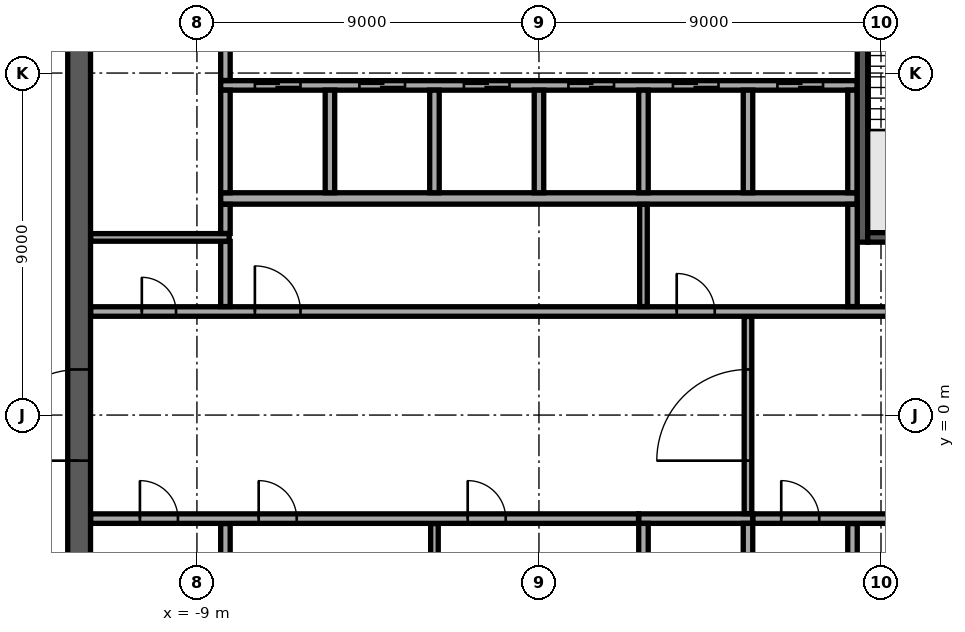
"""IFC4 building model, lengths in metres.
Left out: names, types, materials, properties, quantities, classifications, styles, units other than length and angle.
Written with IfcOpenShell. Run it as: python <this file> out.ifc"""

import sys

from ifc_helpers import new_model, si_unit, direction, frame, frame_2d, origin, place, context, subcontext, project, spatial, rectangle, extrude, element, fill, save


model = new_model("IFC4")
c1 = context("Model", 3, precision=1e-05, world=origin(), true_north=direction((0.0, 1.0)))
c2 = subcontext(c1, "Body", "Model", "MODEL_VIEW")
j1 = project(units=[si_unit("LENGTHUNIT", "METRE"), si_unit("PLANEANGLEUNIT", "RADIAN")], contexts=[c1])
p1 = place(None, origin())
s1 = spatial("IfcSite", under=j1, at=p1, CompositionType="ELEMENT")
p2 = place(p1, origin())
s2 = spatial("IfcBuilding", under=s1, at=p2, CompositionType="ELEMENT")
p3 = place(p2, frame((0.0, 0.0, 304.5)))
s3 = spatial("IfcBuildingStorey", under=s2, at=p3, CompositionType="ELEMENT", Elevation=304.5)
p4 = place(p3, frame((-12.1, -11.8, 0.0), z_axis=(0.0, 0.0, 1.0), x_axis=(0.0, 1.0, 0.0)))
e1 = element("IfcWall", 1, at=p4, inside=s3, PredefinedType="SHEAR", context=c2, shape_type="SweptSolid", body=[
    extrude(rectangle(XDim=23.6, YDim=0.6, at=frame_2d((11.8, 0.0))), origin(), (0.0, 0.0, 1.0), 3.65),
])
p5 = place(p4, frame((10.6, 0.0, 0.0)))
e2 = element("IfcOpeningElement", 2, at=p5, cuts=e1, PredefinedType="OPENING", context=c2, shape_type="SweptSolid", body=[
    extrude(rectangle(XDim=2.4, YDim=2.4, at=frame_2d((1.2, 1.2))), frame((0.0, 0.31, 0.0), z_axis=(0.0, -1.0, 0.0), x_axis=(1.0, 0.0, 0.0)), (0.0, 0.0, 1.0), 0.62),
])
p6 = place(p3, frame((-8.375, 5.7, 0.0), z_axis=(0.0, 0.0, 1.0), x_axis=(1.0, 0.0, 0.0)))
e3 = element("IfcWall", 3, at=p6, inside=s3, PredefinedType="SOLIDWALL", context=c2, shape_type="SweptSolid", body=[
    extrude(rectangle(XDim=16.75, YDim=0.3, at=frame_2d((8.375, 0.0))), origin(), (0.0, 0.0, 1.0), 3.65),
])
p7 = place(p3, frame((-8.375, 8.675, 0.0), z_axis=(0.0, 0.0, 1.0), x_axis=(1.0, 0.0, 0.0)))
e4 = element("IfcWall", 4, at=p7, inside=s3, PredefinedType="SOLIDWALL", context=c2, shape_type="SweptSolid", body=[
    extrude(rectangle(XDim=16.75, YDim=0.25, at=frame_2d((8.375, 0.0))), origin(), (0.0, 0.0, 1.0), 3.65),
])
p8 = place(p7, frame((0.9, 0.0, 0.0)))
e5 = element("IfcOpeningElement", 5, at=p8, cuts=e4, PredefinedType="OPENING", context=c2, shape_type="SweptSolid", body=[
    extrude(rectangle(XDim=1.2, YDim=2.1, at=frame_2d((0.6, 1.05))), frame((0.0, 0.135, 0.0), z_axis=(0.0, -1.0, 0.0), x_axis=(1.0, 0.0, 0.0)), (0.0, 0.0, 1.0), 0.27),
])
p9 = place(p7, frame((3.65, 0.0, 0.0)))
e6 = element("IfcOpeningElement", 6, at=p9, cuts=e4, PredefinedType="OPENING", context=c2, shape_type="SweptSolid", body=[
    extrude(rectangle(XDim=1.2, YDim=2.1, at=frame_2d((0.6, 1.05))), frame((0.0, 0.135, 0.0), z_axis=(0.0, -1.0, 0.0), x_axis=(1.0, 0.0, 0.0)), (0.0, 0.0, 1.0), 0.27),
])
p10 = place(p7, frame((6.4, 0.0, 0.0)))
e7 = element("IfcOpeningElement", 7, at=p10, cuts=e4, PredefinedType="OPENING", context=c2, shape_type="SweptSolid", body=[
    extrude(rectangle(XDim=1.2, YDim=2.1, at=frame_2d((0.6, 1.05))), frame((0.0, 0.135, 0.0), z_axis=(0.0, -1.0, 0.0), x_axis=(1.0, 0.0, 0.0)), (0.0, 0.0, 1.0), 0.27),
])
p11 = place(p7, frame((9.15, 0.0, 0.0)))
e8 = element("IfcOpeningElement", 8, at=p11, cuts=e4, PredefinedType="OPENING", context=c2, shape_type="SweptSolid", body=[
    extrude(rectangle(XDim=1.2, YDim=2.1, at=frame_2d((0.6, 1.05))), frame((0.0, 0.135, 0.0), z_axis=(0.0, -1.0, 0.0), x_axis=(1.0, 0.0, 0.0)), (0.0, 0.0, 1.0), 0.27),
])
p12 = place(p7, frame((11.9, 0.0, 0.0)))
e9 = element("IfcOpeningElement", 9, at=p12, cuts=e4, PredefinedType="OPENING", context=c2, shape_type="SweptSolid", body=[
    extrude(rectangle(XDim=1.2, YDim=2.1, at=frame_2d((0.6, 1.05))), frame((0.0, 0.135, 0.0), z_axis=(0.0, -1.0, 0.0), x_axis=(1.0, 0.0, 0.0)), (0.0, 0.0, 1.0), 0.27),
])
p13 = place(p7, frame((14.65, 0.0, 0.0)))
e10 = element("IfcOpeningElement", 10, at=p13, cuts=e4, PredefinedType="OPENING", context=c2, shape_type="SweptSolid", body=[
    extrude(rectangle(XDim=1.2, YDim=2.1, at=frame_2d((0.6, 1.05))), frame((0.0, 0.135, 0.0), z_axis=(0.0, -1.0, 0.0), x_axis=(1.0, 0.0, 0.0)), (0.0, 0.0, 1.0), 0.27),
])
for number, where, z_axis, x_axis in (
    (11, (-8.25, 5.85, 0.0), (0.0, 0.0, 1.0), (0.0, 1.0, 0.0)),
    (12, (-5.5, 5.85, 0.0), (0.0, 0.0, 1.0), (0.0, 1.0, 0.0)),
    (13, (-2.75, 5.85, 0.0), (0.0, 0.0, 1.0), (0.0, 1.0, 0.0)),
    (14, (0.0, 5.85, 0.0), (0.0, 0.0, 1.0), (0.0, 1.0, 0.0)),
    (15, (2.75, 5.85, 0.0), (0.0, 0.0, 1.0), (0.0, 1.0, 0.0)),
    (16, (5.5, 5.85, 0.0), (0.0, 0.0, 1.0), (0.0, 1.0, 0.0)),
    (17, (8.25, 5.85, 0.0), (0.0, 0.0, 1.0), (0.0, 1.0, 0.0)),
):
    element("IfcWall", number, at=place(p3, frame(where, z_axis=z_axis, x_axis=x_axis)), inside=s3, PredefinedType="SOLIDWALL", context=c2, shape_type="SweptSolid", body=[
        extrude(rectangle(XDim=2.7, YDim=0.25, at=frame_2d((1.35, 0.0))), origin(), (0.0, 0.0, 1.0), 3.65),
    ])
p14 = place(p3, frame((2.625, -2.725, 0.0), z_axis=(0.0, 0.0, 1.0), x_axis=(1.0, 0.0, 0.0)))
e18 = element("IfcWall", 18, at=p14, inside=s3, PredefinedType="SOLIDWALL", context=c2, shape_type="SweptSolid", body=[
    extrude(rectangle(XDim=3.0, YDim=0.25, at=frame_2d((1.5, 0.0))), origin(), (0.0, 0.0, 1.0), 3.65),
])
for number, where, z_axis, x_axis in (
    (19, (2.75, -5.55, 0.0), (0.0, 0.0, 1.0), (0.0, 1.0, 0.0)),
    (20, (5.5, -5.55, 0.0), (0.0, 0.0, 1.0), (0.0, 1.0, 0.0)),
):
    element("IfcWall", number, at=place(p3, frame(where, z_axis=z_axis, x_axis=x_axis)), inside=s3, PredefinedType="SOLIDWALL", context=c2, shape_type="SweptSolid", body=[
        extrude(rectangle(XDim=2.7, YDim=0.25, at=frame_2d((1.35, 0.0))), origin(), (0.0, 0.0, 1.0), 3.65),
    ])
p15 = place(p3, frame((8.512, 4.55, 0.0), z_axis=(0.0, 0.0, 1.0), x_axis=(0.0, 1.0, 0.0)))
e21 = element("IfcWall", 21, at=p15, inside=s3, PredefinedType="SOLIDWALL", context=c2, shape_type="SweptSolid", body=[
    extrude(rectangle(XDim=7.25, YDim=0.275, at=frame_2d((3.625, 0.0))), origin(), (0.0, 0.0, 1.0), 3.65),
])
p16 = place(p15, frame((6.0, 0.0, 0.0)))
e22 = element("IfcOpeningElement", 22, at=p16, cuts=e21, PredefinedType="OPENING", context=c2, shape_type="SweptSolid", body=[
    extrude(rectangle(XDim=1.0, YDim=2.1, at=frame_2d((0.5, 1.05))), frame((0.0, 0.147, 0.0), z_axis=(0.0, -1.0, 0.0), x_axis=(1.0, 0.0, 0.0)), (0.0, 0.0, 1.0), 0.295),
])
p17 = place(p3, frame((8.65, 4.675, 0.0), z_axis=(0.0, 0.0, 1.0), x_axis=(1.0, 0.0, 0.0)))
e23 = element("IfcWall", 23, at=p17, inside=s3, PredefinedType="SOLIDWALL", context=c2, shape_type="SweptSolid", body=[
    extrude(rectangle(XDim=3.15, YDim=0.25, at=frame_2d((1.575, 0.0))), origin(), (0.0, 0.0, 1.0), 3.65),
])
p18 = place(p3, frame((-8.25, -5.545, 0.0), z_axis=(0.0, 0.0, 1.0), x_axis=(0.0, 1.0, 0.0)))
e24 = element("IfcWall", 24, at=p18, inside=s3, PredefinedType="PARTITIONING", context=c2, shape_type="SweptSolid", body=[
    extrude(rectangle(XDim=2.69, YDim=0.25, at=frame_2d((1.345, 0.0))), origin(), (0.0, 0.0, 1.0), 3.65),
])
p19 = place(p3, frame((-2.75, -5.545, 0.0), z_axis=(0.0, 0.0, 1.0), x_axis=(0.0, 1.0, 0.0)))
e25 = element("IfcWall", 25, at=p19, inside=s3, PredefinedType="PARTITIONING", context=c2, shape_type="SweptSolid", body=[
    extrude(rectangle(XDim=2.69, YDim=0.2, at=frame_2d((1.345, 0.0))), origin(), (0.0, 0.0, 1.0), 3.65),
])
p20 = place(p3, frame((8.25, -5.545, 0.0), z_axis=(0.0, 0.0, 1.0), x_axis=(0.0, 1.0, 0.0)))
e26 = element("IfcWall", 26, at=p20, inside=s3, PredefinedType="PARTITIONING", context=c2, shape_type="SweptSolid", body=[
    extrude(rectangle(XDim=2.69, YDim=0.25, at=frame_2d((1.345, 0.0))), origin(), (0.0, 0.0, 1.0), 3.65),
])
p21 = place(p3, frame((-11.795, -2.725, 0.0), z_axis=(0.0, 0.0, 1.0), x_axis=(1.0, 0.0, 0.0)))
e27 = element("IfcWall", 27, at=p21, inside=s3, PredefinedType="PARTITIONING", context=c2, shape_type="SweptSolid", body=[
    extrude(rectangle(XDim=14.415, YDim=0.25, at=frame_2d((7.208, 0.0))), origin(), (0.0, 0.0, 1.0), 3.65),
])
p22 = place(p21, frame((1.295, 0.0, 0.0)))
e28 = element("IfcOpeningElement", 28, at=p22, cuts=e27, PredefinedType="OPENING", context=c2, shape_type="SweptSolid", body=[
    extrude(rectangle(XDim=1.0, YDim=2.1, at=frame_2d((0.5, 1.05))), frame((0.0, 0.135, 0.0), z_axis=(0.0, -1.0, 0.0), x_axis=(1.0, 0.0, 0.0)), (0.0, 0.0, 1.0), 0.27),
])
p23 = place(p21, frame((4.42, 0.0, 0.0)))
e29 = element("IfcOpeningElement", 29, at=p23, cuts=e27, PredefinedType="OPENING", context=c2, shape_type="SweptSolid", body=[
    extrude(rectangle(XDim=1.0, YDim=2.1, at=frame_2d((0.5, 1.05))), frame((0.0, 0.135, 0.0), z_axis=(0.0, -1.0, 0.0), x_axis=(1.0, 0.0, 0.0)), (0.0, 0.0, 1.0), 0.27),
])
p24 = place(p21, frame((9.92, 0.0, 0.0)))
e30 = element("IfcOpeningElement", 30, at=p24, cuts=e27, PredefinedType="OPENING", context=c2, shape_type="SweptSolid", body=[
    extrude(rectangle(XDim=1.0, YDim=2.1, at=frame_2d((0.5, 1.05))), frame((0.0, 0.135, 0.0), z_axis=(0.0, -1.0, 0.0), x_axis=(1.0, 0.0, 0.0)), (0.0, 0.0, 1.0), 0.27),
])
p25 = place(p3, frame((5.63, -2.725, 0.0), z_axis=(0.0, 0.0, 1.0), x_axis=(1.0, 0.0, 0.0)))
e31 = element("IfcWall", 31, at=p25, inside=s3, PredefinedType="PARTITIONING", context=c2, shape_type="SweptSolid", body=[
    extrude(rectangle(XDim=6.165, YDim=0.25, at=frame_2d((3.083, 0.0))), origin(), (0.0, 0.0, 1.0), 3.65),
])
p26 = place(p25, frame((0.745, 0.0, 0.0)))
e32 = element("IfcOpeningElement", 32, at=p26, cuts=e31, PredefinedType="OPENING", context=c2, shape_type="SweptSolid", body=[
    extrude(rectangle(XDim=1.0, YDim=2.1, at=frame_2d((0.5, 1.05))), frame((0.0, 0.135, 0.0), z_axis=(0.0, -1.0, 0.0), x_axis=(1.0, 0.0, 0.0)), (0.0, 0.0, 1.0), 0.27),
])
p27 = place(p25, frame((3.92, 0.0, 0.0)))
e33 = element("IfcOpeningElement", 33, at=p27, cuts=e31, PredefinedType="OPENING", context=c2, shape_type="SweptSolid", body=[
    extrude(rectangle(XDim=0.9, YDim=2.1, at=frame_2d((0.45, 1.05))), frame((0.0, 0.135, 0.0), z_axis=(0.0, -1.0, 0.0), x_axis=(1.0, 0.0, 0.0)), (0.0, 0.0, 1.0), 0.27),
])
p28 = place(p3, frame((5.5, -2.595, 0.0), z_axis=(0.0, 0.0, 1.0), x_axis=(0.0, 1.0, 0.0)))
e34 = element("IfcWall", 34, at=p28, inside=s3, PredefinedType="PARTITIONING", context=c2, shape_type="SweptSolid", body=[
    extrude(rectangle(XDim=5.19, YDim=0.2, at=frame_2d((2.595, 0.0))), origin(), (0.0, 0.0, 1.0), 3.65),
])
p29 = place(p28, frame((1.395, 0.0, 0.0)))
e35 = element("IfcOpeningElement", 35, at=p29, cuts=e34, PredefinedType="OPENING", context=c2, shape_type="SweptSolid", body=[
    extrude(rectangle(XDim=2.4, YDim=2.4, at=frame_2d((1.2, 1.2))), frame((0.0, 0.11, 0.0), z_axis=(0.0, -1.0, 0.0), x_axis=(1.0, 0.0, 0.0)), (0.0, 0.0, 1.0), 0.22),
])
p30 = place(p3, frame((-11.795, 2.725, 0.0), z_axis=(0.0, 0.0, 1.0), x_axis=(1.0, 0.0, 0.0)))
e36 = element("IfcWall", 36, at=p30, inside=s3, PredefinedType="PARTITIONING", context=c2, shape_type="SweptSolid", body=[
    extrude(rectangle(XDim=23.59, YDim=0.25, at=frame_2d((11.795, 0.0))), origin(), (0.0, 0.0, 1.0), 3.65),
])
p31 = place(p30, frame((21.345, 0.0, 0.0)))
e37 = element("IfcOpeningElement", 37, at=p31, cuts=e36, PredefinedType="OPENING", context=c2, shape_type="SweptSolid", body=[
    extrude(rectangle(XDim=0.9, YDim=2.1, at=frame_2d((0.45, 1.05))), frame((0.0, 0.135, 0.0), z_axis=(0.0, -1.0, 0.0), x_axis=(1.0, 0.0, 0.0)), (0.0, 0.0, 1.0), 0.27),
])
p32 = place(p30, frame((1.345, 0.0, 0.0)))
e38 = element("IfcOpeningElement", 38, at=p32, cuts=e36, PredefinedType="OPENING", context=c2, shape_type="SweptSolid", body=[
    extrude(rectangle(XDim=0.9, YDim=2.1, at=frame_2d((0.45, 1.05))), frame((0.0, 0.135, 0.0), z_axis=(0.0, -1.0, 0.0), x_axis=(1.0, 0.0, 0.0)), (0.0, 0.0, 1.0), 0.27),
])
p33 = place(p30, frame((4.32, 0.0, 0.0)))
e39 = element("IfcOpeningElement", 39, at=p33, cuts=e36, PredefinedType="OPENING", context=c2, shape_type="SweptSolid", body=[
    extrude(rectangle(XDim=1.2, YDim=2.1, at=frame_2d((0.6, 1.05))), frame((0.0, 0.135, 0.0), z_axis=(0.0, -1.0, 0.0), x_axis=(1.0, 0.0, 0.0)), (0.0, 0.0, 1.0), 0.27),
])
p34 = place(p30, frame((15.42, 0.0, 0.0)))
e40 = element("IfcOpeningElement", 40, at=p34, cuts=e36, PredefinedType="OPENING", context=c2, shape_type="SweptSolid", body=[
    extrude(rectangle(XDim=1.0, YDim=2.1, at=frame_2d((0.5, 1.05))), frame((0.0, 0.135, 0.0), z_axis=(0.0, -1.0, 0.0), x_axis=(1.0, 0.0, 0.0)), (0.0, 0.0, 1.0), 0.27),
])
p35 = place(p3, frame((-8.25, 2.855, 0.0), z_axis=(0.0, 0.0, 1.0), x_axis=(0.0, 1.0, 0.0)))
e41 = element("IfcWall", 41, at=p35, inside=s3, PredefinedType="PARTITIONING", context=c2, shape_type="SweptSolid", body=[
    extrude(rectangle(XDim=1.715, YDim=0.25, at=frame_2d((0.857, 0.0))), origin(), (0.0, 0.0, 1.0), 3.65),
])
p36 = place(p3, frame((2.75, 2.855, 0.0), z_axis=(0.0, 0.0, 1.0), x_axis=(0.0, 1.0, 0.0)))
e42 = element("IfcWall", 42, at=p36, inside=s3, PredefinedType="PARTITIONING", context=c2, shape_type="SweptSolid", body=[
    extrude(rectangle(XDim=2.69, YDim=0.2, at=frame_2d((1.345, 0.0))), origin(), (0.0, 0.0, 1.0), 3.65),
])
p37 = place(p3, frame((8.25, 2.855, 0.0), z_axis=(0.0, 0.0, 1.0), x_axis=(0.0, 1.0, 0.0)))
e43 = element("IfcWall", 43, at=p37, inside=s3, PredefinedType="PARTITIONING", context=c2, shape_type="SweptSolid", body=[
    extrude(rectangle(XDim=2.69, YDim=0.25, at=frame_2d((1.345, 0.0))), origin(), (0.0, 0.0, 1.0), 3.65),
])
p38 = place(p3, frame((-11.795, 4.675, 0.0), z_axis=(0.0, 0.0, 1.0), x_axis=(1.0, 0.0, 0.0)))
e44 = element("IfcWall", 44, at=p38, inside=s3, PredefinedType="PARTITIONING", context=c2, shape_type="SweptSolid", body=[
    extrude(rectangle(XDim=3.645, YDim=0.2, at=frame_2d((1.823, 0.0))), origin(), (0.0, 0.0, 1.0), 3.65),
])
p39 = place(p3, frame((-8.25, 4.78, 0.0), z_axis=(0.0, 0.0, 1.0), x_axis=(0.0, 1.0, 0.0)))
e45 = element("IfcWall", 45, at=p39, inside=s3, PredefinedType="PARTITIONING", context=c2, shape_type="SweptSolid", body=[
    extrude(rectangle(XDim=0.765, YDim=0.25, at=frame_2d((0.382, 0.0))), origin(), (0.0, 0.0, 1.0), 3.65),
])
p40 = place(p3, frame((-8.25, 8.805, 0.0), z_axis=(0.0, 0.0, 1.0), x_axis=(0.0, 1.0, 0.0)))
e46 = element("IfcWall", 46, at=p40, inside=s3, PredefinedType="PARTITIONING", context=c2, shape_type="SweptSolid", body=[
    extrude(rectangle(XDim=2.99, YDim=0.25, at=frame_2d((1.495, 0.0))), origin(), (0.0, 0.0, 1.0), 3.65),
])
p41 = place(p40, frame((0.895, 0.0, 0.0)))
e47 = element("IfcOpeningElement", 47, at=p41, cuts=e46, PredefinedType="OPENING", context=c2, shape_type="SweptSolid", body=[
    extrude(rectangle(XDim=1.0, YDim=2.1, at=frame_2d((0.5, 1.05))), frame((0.0, 0.135, 0.0), z_axis=(0.0, -1.0, 0.0), x_axis=(1.0, 0.0, 0.0)), (0.0, 0.0, 1.0), 0.27),
])
p42 = place(p5, origin())
e48 = element("IfcDoor", 48, at=p42, inside=s3, OperationType="SINGLE_SWING_LEFT", PredefinedType="DOOR", context=c2, shape_type="SweptSolid", body=[
    extrude(rectangle(XDim=2.4, YDim=2.4, at=frame_2d((1.2, 1.2))), frame((0.0, 0.025, 0.0), z_axis=(0.0, -1.0, 0.0), x_axis=(1.0, 0.0, 0.0)), (0.0, 0.0, 1.0), 0.05),
])
fill(e2, e48)
p43 = place(p8, origin())
e49 = element("IfcDoor", 49, at=p43, inside=s3, OperationType="DOUBLE_DOOR_SLIDING", PredefinedType="DOOR", context=c2, shape_type="SweptSolid", body=[
    extrude(rectangle(XDim=1.2, YDim=2.1, at=frame_2d((0.6, 1.05))), frame((0.0, 0.025, 0.0), z_axis=(0.0, -1.0, 0.0), x_axis=(1.0, 0.0, 0.0)), (0.0, 0.0, 1.0), 0.05),
])
fill(e5, e49)
p44 = place(p9, origin())
e50 = element("IfcDoor", 50, at=p44, inside=s3, OperationType="DOUBLE_DOOR_SLIDING", PredefinedType="DOOR", context=c2, shape_type="SweptSolid", body=[
    extrude(rectangle(XDim=1.2, YDim=2.1, at=frame_2d((0.6, 1.05))), frame((0.0, 0.025, 0.0), z_axis=(0.0, -1.0, 0.0), x_axis=(1.0, 0.0, 0.0)), (0.0, 0.0, 1.0), 0.05),
])
fill(e6, e50)
p45 = place(p10, origin())
e51 = element("IfcDoor", 51, at=p45, inside=s3, OperationType="DOUBLE_DOOR_SLIDING", PredefinedType="DOOR", context=c2, shape_type="SweptSolid", body=[
    extrude(rectangle(XDim=1.2, YDim=2.1, at=frame_2d((0.6, 1.05))), frame((0.0, 0.025, 0.0), z_axis=(0.0, -1.0, 0.0), x_axis=(1.0, 0.0, 0.0)), (0.0, 0.0, 1.0), 0.05),
])
fill(e7, e51)
p46 = place(p11, origin())
e52 = element("IfcDoor", 52, at=p46, inside=s3, OperationType="DOUBLE_DOOR_SLIDING", PredefinedType="DOOR", context=c2, shape_type="SweptSolid", body=[
    extrude(rectangle(XDim=1.2, YDim=2.1, at=frame_2d((0.6, 1.05))), frame((0.0, 0.025, 0.0), z_axis=(0.0, -1.0, 0.0), x_axis=(1.0, 0.0, 0.0)), (0.0, 0.0, 1.0), 0.05),
])
fill(e8, e52)
p47 = place(p12, origin())
e53 = element("IfcDoor", 53, at=p47, inside=s3, OperationType="DOUBLE_DOOR_SLIDING", PredefinedType="DOOR", context=c2, shape_type="SweptSolid", body=[
    extrude(rectangle(XDim=1.2, YDim=2.1, at=frame_2d((0.6, 1.05))), frame((0.0, 0.025, 0.0), z_axis=(0.0, -1.0, 0.0), x_axis=(1.0, 0.0, 0.0)), (0.0, 0.0, 1.0), 0.05),
])
fill(e9, e53)
p48 = place(p13, origin())
e54 = element("IfcDoor", 54, at=p48, inside=s3, OperationType="DOUBLE_DOOR_SLIDING", PredefinedType="DOOR", context=c2, shape_type="SweptSolid", body=[
    extrude(rectangle(XDim=1.2, YDim=2.1, at=frame_2d((0.6, 1.05))), frame((0.0, 0.025, 0.0), z_axis=(0.0, -1.0, 0.0), x_axis=(1.0, 0.0, 0.0)), (0.0, 0.0, 1.0), 0.05),
])
fill(e10, e54)
p49 = place(p22, origin())
e55 = element("IfcDoor", 55, at=p49, inside=s3, OperationType="SINGLE_SWING_LEFT", PredefinedType="DOOR", context=c2, shape_type="SweptSolid", body=[
    extrude(rectangle(XDim=1.0, YDim=2.1, at=frame_2d((0.5, 1.05))), frame((0.0, 0.025, 0.0), z_axis=(0.0, -1.0, 0.0), x_axis=(1.0, 0.0, 0.0)), (0.0, 0.0, 1.0), 0.05),
])
fill(e28, e55)
p50 = place(p26, origin())
e56 = element("IfcDoor", 56, at=p50, inside=s3, OperationType="SINGLE_SWING_LEFT", PredefinedType="DOOR", context=c2, shape_type="SweptSolid", body=[
    extrude(rectangle(XDim=1.0, YDim=2.1, at=frame_2d((0.5, 1.05))), frame((0.0, 0.025, 0.0), z_axis=(0.0, -1.0, 0.0), x_axis=(1.0, 0.0, 0.0)), (0.0, 0.0, 1.0), 0.05),
])
fill(e32, e56)
p51 = place(p32, origin())
e57 = element("IfcDoor", 57, at=p51, inside=s3, OperationType="SINGLE_SWING_LEFT", PredefinedType="DOOR", context=c2, shape_type="SweptSolid", body=[
    extrude(rectangle(XDim=0.9, YDim=2.1, at=frame_2d((0.45, 1.05))), frame((0.0, 0.025, 0.0), z_axis=(0.0, -1.0, 0.0), x_axis=(1.0, 0.0, 0.0)), (0.0, 0.0, 1.0), 0.05),
])
fill(e38, e57)
p52 = place(p33, origin())
e58 = element("IfcDoor", 58, at=p52, inside=s3, OperationType="SINGLE_SWING_LEFT", PredefinedType="DOOR", context=c2, shape_type="SweptSolid", body=[
    extrude(rectangle(XDim=1.2, YDim=2.1, at=frame_2d((0.6, 1.05))), frame((0.0, 0.025, 0.0), z_axis=(0.0, -1.0, 0.0), x_axis=(1.0, 0.0, 0.0)), (0.0, 0.0, 1.0), 0.05),
])
fill(e39, e58)
p53 = place(p34, origin())
e59 = element("IfcDoor", 59, at=p53, inside=s3, OperationType="SINGLE_SWING_LEFT", PredefinedType="DOOR", context=c2, shape_type="SweptSolid", body=[
    extrude(rectangle(XDim=1.0, YDim=2.1, at=frame_2d((0.5, 1.05))), frame((0.0, 0.025, 0.0), z_axis=(0.0, -1.0, 0.0), x_axis=(1.0, 0.0, 0.0)), (0.0, 0.0, 1.0), 0.05),
])
fill(e40, e59)
p54 = place(p23, origin())
e60 = element("IfcDoor", 60, at=p54, inside=s3, OperationType="SINGLE_SWING_LEFT", PredefinedType="DOOR", context=c2, shape_type="SweptSolid", body=[
    extrude(rectangle(XDim=1.0, YDim=2.1, at=frame_2d((0.5, 1.05))), frame((0.0, 0.025, 0.0), z_axis=(0.0, -1.0, 0.0), x_axis=(1.0, 0.0, 0.0)), (0.0, 0.0, 1.0), 0.05),
])
fill(e29, e60)
p55 = place(p24, origin())
e61 = element("IfcDoor", 61, at=p55, inside=s3, OperationType="SINGLE_SWING_LEFT", PredefinedType="DOOR", context=c2, shape_type="SweptSolid", body=[
    extrude(rectangle(XDim=1.0, YDim=2.1, at=frame_2d((0.5, 1.05))), frame((0.0, 0.025, 0.0), z_axis=(0.0, -1.0, 0.0), x_axis=(1.0, 0.0, 0.0)), (0.0, 0.0, 1.0), 0.05),
])
fill(e30, e61)
p56 = place(p29, origin())
e62 = element("IfcDoor", 62, at=p56, inside=s3, OperationType="SINGLE_SWING_LEFT", PredefinedType="DOOR", context=c2, shape_type="SweptSolid", body=[
    extrude(rectangle(XDim=2.4, YDim=2.4, at=frame_2d((1.2, 1.2))), frame((0.0, 0.025, 0.0), z_axis=(0.0, -1.0, 0.0), x_axis=(1.0, 0.0, 0.0)), (0.0, 0.0, 1.0), 0.05),
])
fill(e35, e62)
save(model, sys.argv[1])
